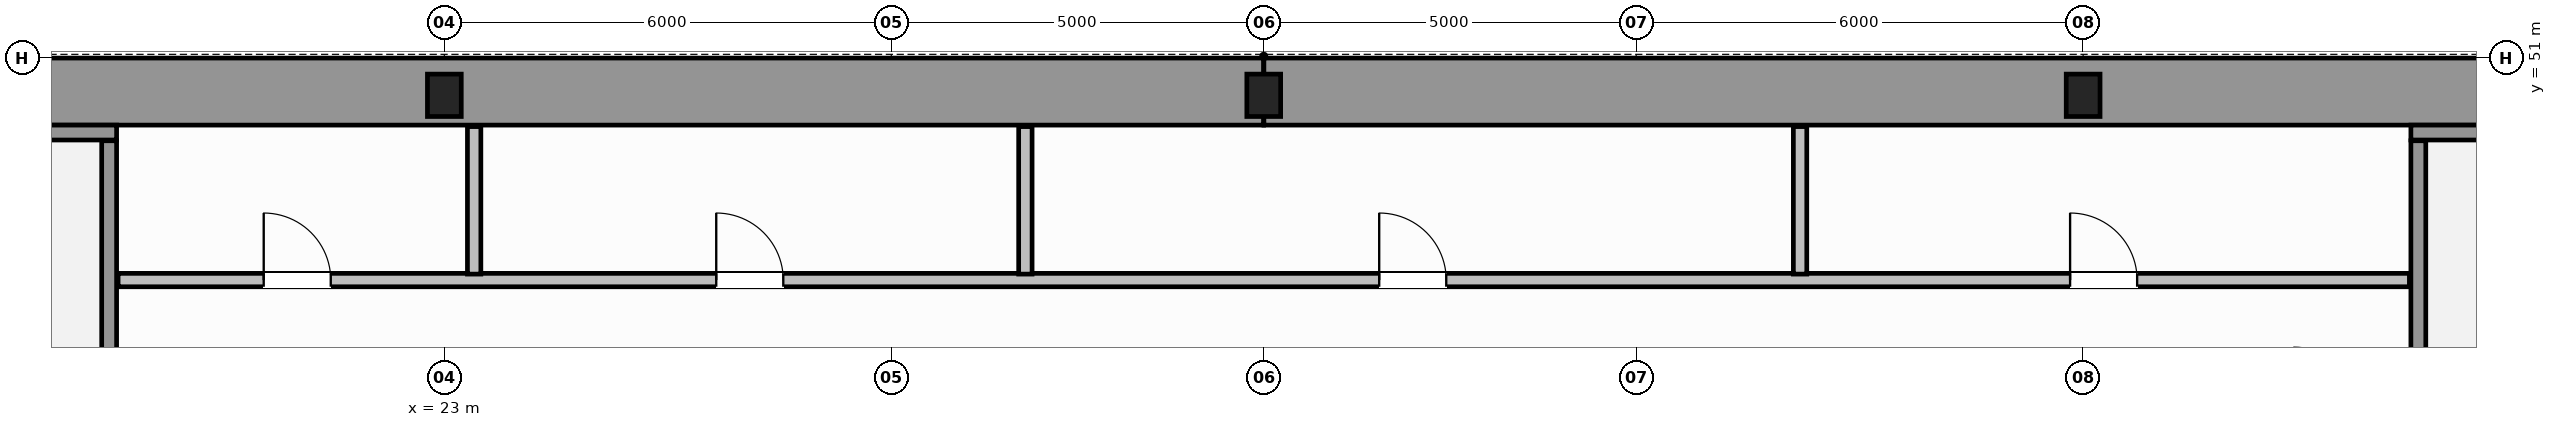
"""IFC4 building model, lengths in metres.
Left out: names, types, materials, properties, quantities, classifications, styles, units other than length and angle.
Written with IfcOpenShell. Run it as: python <this file> out.ifc"""

import sys

from ifc_helpers import new_model, si_unit, direction, frame, frame_2d, origin, origin_2d, place, context, subcontext, project, spatial, rectangle, i_section, extrude, source, transform, mapped, element, fill, save


model = new_model("IFC4")
c1 = context("Model", 3, precision=1e-05, world=origin(), true_north=direction((0.0, 1.0)))
c2 = subcontext(c1, "Body", "Model", "MODEL_VIEW")
j1 = project(units=[si_unit("LENGTHUNIT", "METRE"), si_unit("PLANEANGLEUNIT", "RADIAN")], contexts=[c1])
p1 = place(None, origin())
s1 = spatial("IfcSite", under=j1, at=p1, CompositionType="ELEMENT")
p2 = place(p1, origin())
s2 = spatial("IfcBuilding", under=s1, at=p2, CompositionType="ELEMENT")
p3 = place(p2, frame((0.0, 0.0, 37.8)))
s3 = spatial("IfcBuildingStorey", under=s2, at=p3, CompositionType="ELEMENT", Elevation=37.8)
m1 = source(origin(), c2, "Body", "SweptSolid", [
    extrude(i_section(OverallWidth=0.454, OverallDepth=0.569, WebThickness=0.078, FlangeThickness=0.08, FilletRadius=0.015, at=origin_2d()), origin(), (0.0, 0.0, 1.0), 3.8),
])
for number, where, z_axis, x_axis in (
    (1, (23.0, 50.5, 0.0), (0.0, 0.0, 1.0), (1.0, 0.0, 0.0)),
    (2, (34.0, 50.5, 0.0), (0.0, 0.0, 1.0), (1.0, 0.0, 0.0)),
    (3, (45.0, 50.5, 0.0), (0.0, 0.0, 1.0), (1.0, 0.0, 0.0)),
):
    element("IfcColumn", number, at=place(p3, frame(where, z_axis=z_axis, x_axis=x_axis)), inside=s3, PredefinedType="COLUMN", context=c2, shape_type="MappedRepresentation", body=[
        mapped(m1, transform((0.0, 0.0, 0.0), scale=1.0)),
    ])
for number, where, z_axis, x_axis in (
    (4, (14.454, 50.55, 0.0), (0.0, 0.0, 1.0), (1.0, 0.0, 0.0)),
    (5, (34.002, 50.55, 0.0), (0.0, 0.0, 1.0), (1.0, 0.0, 0.0)),
):
    element("IfcWall", number, at=place(p3, frame(where, z_axis=z_axis, x_axis=x_axis)), inside=s3, PredefinedType="SHEAR", context=c2, shape_type="SweptSolid", body=[
        extrude(rectangle(XDim=19.544, YDim=0.9, at=frame_2d((9.772, 0.0))), origin(), (0.0, 0.0, 1.0), 3.8),
    ])
p4 = place(p3, frame((14.45, 50.0, 0.0), z_axis=(0.0, 0.0, 1.0), x_axis=(1.0, 0.0, 0.0)))
e6 = element("IfcWall", 6, at=p4, inside=s3, PredefinedType="SOLIDWALL", context=c2, shape_type="SweptSolid", body=[
    extrude(rectangle(XDim=4.15, YDim=0.2, at=frame_2d((2.075, 0.0))), origin(), (0.0, 0.0, 1.0), 3.8),
])
p5 = place(p3, frame((18.5, 39.96, 0.0), z_axis=(0.0, 0.0, 1.0), x_axis=(0.0, 1.0, 0.0)))
e7 = element("IfcWall", 7, at=p5, inside=s3, PredefinedType="SOLIDWALL", context=c2, shape_type="SweptSolid", body=[
    extrude(rectangle(XDim=9.93, YDim=0.2, at=frame_2d((4.965, 0.0))), origin(), (0.0, 0.0, 1.0), 3.8),
])
p6 = place(p3, frame((49.4, 50.0, 0.0), z_axis=(0.0, 0.0, 1.0), x_axis=(1.0, 0.0, 0.0)))
e8 = element("IfcWall", 8, at=p6, inside=s3, PredefinedType="SOLIDWALL", context=c2, shape_type="SweptSolid", body=[
    extrude(rectangle(XDim=4.15, YDim=0.2, at=frame_2d((2.075, 0.0))), origin(), (0.0, 0.0, 1.0), 3.8),
])
p7 = place(p3, frame((49.5, 39.96, 0.0), z_axis=(0.0, 0.0, 1.0), x_axis=(0.0, 1.0, 0.0)))
e9 = element("IfcWall", 9, at=p7, inside=s3, PredefinedType="SOLIDWALL", context=c2, shape_type="SweptSolid", body=[
    extrude(rectangle(XDim=9.93, YDim=0.2, at=frame_2d((4.965, 0.0))), origin(), (0.0, 0.0, 1.0), 3.8),
])
p8 = place(p3, frame((18.62, 48.02, 0.0), z_axis=(0.0, 0.0, 1.0), x_axis=(1.0, 0.0, 0.0)))
e10 = element("IfcWall", 10, at=p8, inside=s3, PredefinedType="PLUMBINGWALL", context=c2, shape_type="SweptSolid", body=[
    extrude(rectangle(XDim=30.76, YDim=0.18, at=frame_2d((15.38, 0.0))), origin(), (0.0, 0.0, 1.0), 3.58),
])
p9 = place(p8, frame((1.955, 0.0, 0.0)))
e11 = element("IfcOpeningElement", 11, at=p9, cuts=e10, PredefinedType="OPENING", context=c2, shape_type="SweptSolid", body=[
    extrude(rectangle(XDim=0.9, YDim=2.15, at=frame_2d((0.45, 1.075))), frame((0.0, 0.1, 0.0), z_axis=(0.0, -1.0, 0.0), x_axis=(1.0, 0.0, 0.0)), (0.0, 0.0, 1.0), 0.2),
])
p10 = place(p8, frame((8.03, 0.0, 0.0)))
e12 = element("IfcOpeningElement", 12, at=p10, cuts=e10, PredefinedType="OPENING", context=c2, shape_type="SweptSolid", body=[
    extrude(rectangle(XDim=0.9, YDim=2.15, at=frame_2d((0.45, 1.075))), frame((0.0, 0.1, 0.0), z_axis=(0.0, -1.0, 0.0), x_axis=(1.0, 0.0, 0.0)), (0.0, 0.0, 1.0), 0.2),
])
p11 = place(p8, frame((16.93, 0.0, 0.0)))
e13 = element("IfcOpeningElement", 13, at=p11, cuts=e10, PredefinedType="OPENING", context=c2, shape_type="SweptSolid", body=[
    extrude(rectangle(XDim=0.9, YDim=2.15, at=frame_2d((0.45, 1.075))), frame((0.0, 0.1, 0.0), z_axis=(0.0, -1.0, 0.0), x_axis=(1.0, 0.0, 0.0)), (0.0, 0.0, 1.0), 0.2),
])
p12 = place(p8, frame((26.205, 0.0, 0.0)))
e14 = element("IfcOpeningElement", 14, at=p12, cuts=e10, PredefinedType="OPENING", context=c2, shape_type="SweptSolid", body=[
    extrude(rectangle(XDim=0.9, YDim=2.15, at=frame_2d((0.45, 1.075))), frame((0.0, 0.1, 0.0), z_axis=(0.0, -1.0, 0.0), x_axis=(1.0, 0.0, 0.0)), (0.0, 0.0, 1.0), 0.2),
])
for number, where, z_axis, x_axis in (
    (15, (23.4, 48.1, 0.0), (0.0, 0.0, 1.0), (0.0, 1.0, 0.0)),
    (16, (30.8, 48.1, 0.0), (0.0, 0.0, 1.0), (0.0, 1.0, 0.0)),
    (17, (41.2, 48.1, 0.0), (0.0, 0.0, 1.0), (0.0, 1.0, 0.0)),
):
    element("IfcWall", number, at=place(p3, frame(where, z_axis=z_axis, x_axis=x_axis)), inside=s3, PredefinedType="PLUMBINGWALL", context=c2, shape_type="SweptSolid", body=[
        extrude(rectangle(XDim=1.98, YDim=0.18, at=frame_2d((0.99, 0.0))), origin(), (0.0, 0.0, 1.0), 3.58),
    ])
m2 = source(origin(), c2, "Body", "SweptSolid", [
    extrude(rectangle(XDim=0.9, YDim=2.15, at=frame_2d((0.45, 1.075))), frame((0.0, 0.025, 0.0), z_axis=(0.0, -1.0, 0.0), x_axis=(1.0, 0.0, 0.0)), (0.0, 0.0, 1.0), 0.05),
])
p13 = place(p9, origin())
e18 = element("IfcDoor", 18, at=p13, inside=s3, OperationType="SINGLE_SWING_LEFT", PredefinedType="DOOR", context=c2, shape_type="MappedRepresentation", body=[
    mapped(m2, transform((0.0, 0.0, 0.0), scale=1.0)),
])
fill(e11, e18)
p14 = place(p10, origin())
e19 = element("IfcDoor", 19, at=p14, inside=s3, OperationType="SINGLE_SWING_RIGHT", PredefinedType="DOOR", context=c2, shape_type="MappedRepresentation", body=[
    mapped(m2, transform((0.0, 0.0, 0.0), scale=1.0)),
])
fill(e12, e19)
p15 = place(p11, origin())
e20 = element("IfcDoor", 20, at=p15, inside=s3, OperationType="SINGLE_SWING_LEFT", PredefinedType="DOOR", context=c2, shape_type="MappedRepresentation", body=[
    mapped(m2, transform((0.0, 0.0, 0.0), scale=1.0)),
])
fill(e13, e20)
p16 = place(p12, origin())
e21 = element("IfcDoor", 21, at=p16, inside=s3, OperationType="SINGLE_SWING_RIGHT", PredefinedType="DOOR", context=c2, shape_type="MappedRepresentation", body=[
    mapped(m2, transform((0.0, 0.0, 0.0), scale=1.0)),
])
fill(e14, e21)
save(model, sys.argv[1])
